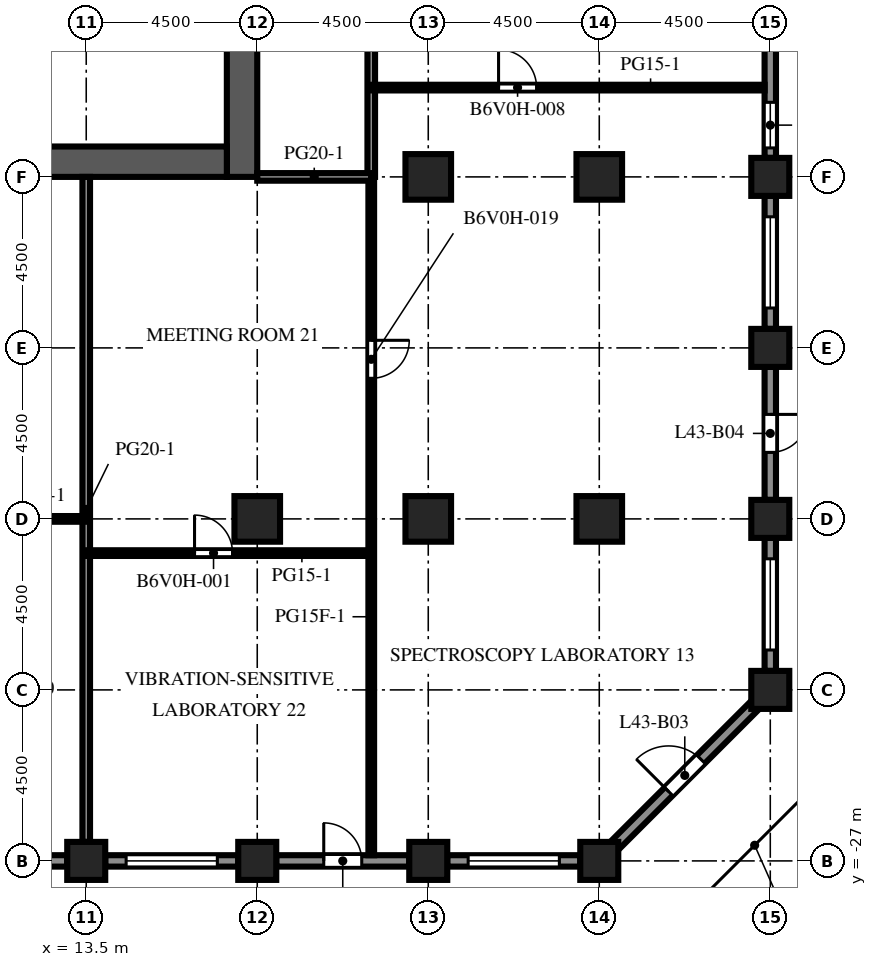
"""IFC4 building model, lengths in metres.
Left out: names, types, materials, properties, quantities, classifications, styles, units other than length and angle.
Written with IfcOpenShell. Run it as: python <this file> out.ifc"""

import sys

from ifc_helpers import new_model, si_unit, direction, frame, frame_2d, origin, origin_2d, place, context, subcontext, project, spatial, rectangle, extrude, element, fill, save


model = new_model("IFC4")
c1 = context("Model", 3, precision=1e-05, world=origin(), true_north=direction((0.0, 1.0)))
c2 = subcontext(c1, "Body", "Model", "MODEL_VIEW")
j1 = project(units=[si_unit("LENGTHUNIT", "METRE"), si_unit("PLANEANGLEUNIT", "RADIAN")], contexts=[c1])
p1 = place(None, origin())
s1 = spatial("IfcSite", under=j1, at=p1, CompositionType="ELEMENT")
p2 = place(p1, origin())
s2 = spatial("IfcBuilding", under=s1, at=p2, CompositionType="ELEMENT")
p3 = place(p2, frame((0.0, 0.0, 191.5)))
s3 = spatial("IfcBuildingStorey", under=s2, at=p3, CompositionType="ELEMENT", Elevation=191.5)
for number, where, z_axis, x_axis in (
    (1, (13.5, -27.0, 0.0), (0.0, 0.0, 1.0), (1.0, 0.0, 0.0)),
    (2, (18.0, -27.0, 0.0), (0.0, 0.0, 1.0), (1.0, 0.0, 0.0)),
    (3, (22.5, -27.0, 0.0), (0.0, 0.0, 1.0), (1.0, 0.0, 0.0)),
    (4, (27.0, -27.0, 0.0), (0.0, 0.0, 1.0), (1.0, 0.0, 0.0)),
):
    element("IfcColumn", number, at=place(p3, frame(where, z_axis=z_axis, x_axis=x_axis)), inside=s3, PredefinedType="COLUMN", context=c2, shape_type="SweptSolid", body=[
        extrude(rectangle(XDim=1.0, YDim=1.0, at=origin_2d()), origin(), (0.0, 0.0, 1.0), 4.1),
    ])
for number, where, z_axis, x_axis in (
    (5, (31.5, -22.5, -0.45), (0.0, 0.0, 1.0), (1.0, 0.0, 0.0)),
    (6, (31.5, -18.0, -0.45), (0.0, 0.0, 1.0), (1.0, 0.0, 0.0)),
    (7, (31.5, -13.5, -0.45), (0.0, 0.0, 1.0), (1.0, 0.0, 0.0)),
    (8, (31.5, -9.0, -0.45), (0.0, 0.0, 1.0), (1.0, 0.0, 0.0)),
):
    element("IfcColumn", number, at=place(p3, frame(where, z_axis=z_axis, x_axis=x_axis)), inside=s3, PredefinedType="COLUMN", context=c2, shape_type="SweptSolid", body=[
        extrude(rectangle(XDim=1.0, YDim=1.0, at=origin_2d()), origin(), (0.0, 0.0, 1.0), 4.55),
    ])
for number, where, z_axis, x_axis in (
    (9, (18.0, -18.0, -0.45), (0.0, 0.0, 1.0), (1.0, 0.0, 0.0)),
    (10, (22.5, -18.0, -0.45), (0.0, 0.0, 1.0), (1.0, 0.0, 0.0)),
    (11, (22.5, -9.0, -0.45), (0.0, 0.0, 1.0), (1.0, 0.0, 0.0)),
    (12, (27.0, -18.0, -0.45), (0.0, 0.0, 1.0), (1.0, 0.0, 0.0)),
    (13, (27.0, -9.0, -0.45), (0.0, 0.0, 1.0), (1.0, 0.0, 0.0)),
):
    element("IfcColumn", number, at=place(p3, frame(where, z_axis=z_axis, x_axis=x_axis)), inside=s3, PredefinedType="COLUMN", context=c2, shape_type="SweptSolid", body=[
        extrude(rectangle(XDim=1.2, YDim=1.2, at=origin_2d()), origin(), (0.0, 0.0, 1.0), 4.55),
    ])
p4 = place(p3, frame((17.6, -9.0, 0.0), z_axis=(0.0, 0.0, 1.0), x_axis=(0.0, 1.0, 0.0)))
e14 = element("IfcWall", 14, at=p4, inside=s3, PredefinedType="SHEAR", context=c2, shape_type="SweptSolid", body=[
    extrude(rectangle(XDim=27.5, YDim=0.8, at=frame_2d((13.75, 0.0))), origin(), (0.0, 0.0, 1.0), 4.1),
])
p5 = place(p4, frame((12.55, 0.0, 0.0)))
e15 = element("IfcOpeningElement", 15, at=p5, cuts=e14, PredefinedType="OPENING", context=c2, shape_type="SweptSolid", body=[
    extrude(rectangle(XDim=2.4, YDim=2.4, at=frame_2d((1.2, 1.2))), frame((0.0, 0.41, 0.0), z_axis=(0.0, -1.0, 0.0), x_axis=(1.0, 0.0, 0.0)), (0.0, 0.0, 1.0), 0.82),
])
p6 = place(p4, frame((6.825, 0.0, 0.0)))
e16 = element("IfcOpeningElement", 16, at=p6, cuts=e14, PredefinedType="OPENING", context=c2, shape_type="SweptSolid", body=[
    extrude(rectangle(XDim=1.2, YDim=2.1, at=frame_2d((0.6, 1.05))), frame((0.0, 0.41, 0.0), z_axis=(0.0, -1.0, 0.0), x_axis=(1.0, 0.0, 0.0)), (0.0, 0.0, 1.0), 0.82),
])
p7 = place(p4, frame((19.475, 0.0, 0.0)))
e17 = element("IfcOpeningElement", 17, at=p7, cuts=e14, PredefinedType="OPENING", context=c2, shape_type="SweptSolid", body=[
    extrude(rectangle(XDim=1.2, YDim=2.1, at=frame_2d((0.6, 1.05))), frame((0.0, 0.41, 0.0), z_axis=(0.0, -1.0, 0.0), x_axis=(1.0, 0.0, 0.0)), (0.0, 0.0, 1.0), 0.82),
])
p8 = place(p3, frame((6.8, -8.6, 0.0), z_axis=(0.0, 0.0, 1.0), x_axis=(1.0, 0.0, 0.0)))
e18 = element("IfcWall", 18, at=p8, inside=s3, PredefinedType="SHEAR", context=c2, shape_type="SweptSolid", body=[
    extrude(rectangle(XDim=10.4, YDim=0.8, at=frame_2d((5.2, 0.0))), origin(), (0.0, 0.0, 1.0), 4.1),
])
p9 = place(p3, frame((13.0, -27.0, 0.0), z_axis=(0.0, 0.0, 1.0), x_axis=(-1.0, 0.0, 0.0)))
e19 = element("IfcWall", 19, at=p9, inside=s3, PredefinedType="SOLIDWALL", context=c2, shape_type="SweptSolid", body=[
    extrude(rectangle(XDim=3.5, YDim=0.3, at=frame_2d((1.75, 0.0))), origin(), (0.0, 0.0, 1.0), 2.85),
])
p10 = place(p9, frame((0.55, 0.0, 0.8)))
e20 = element("IfcOpeningElement", 20, at=p10, cuts=e19, PredefinedType="OPENING", context=c2, shape_type="SweptSolid", body=[
    extrude(rectangle(XDim=2.4, YDim=1.7, at=frame_2d((1.2, 0.85))), frame((0.0, 0.16, 0.0), z_axis=(0.0, -1.0, 0.0), x_axis=(1.0, 0.0, 0.0)), (0.0, 0.0, 1.0), 0.32),
])
p11 = place(p3, frame((17.5, -27.0, 0.0), z_axis=(0.0, 0.0, 1.0), x_axis=(-1.0, 0.0, 0.0)))
e21 = element("IfcWall", 21, at=p11, inside=s3, PredefinedType="SOLIDWALL", context=c2, shape_type="SweptSolid", body=[
    extrude(rectangle(XDim=3.5, YDim=0.3, at=frame_2d((1.75, 0.0))), origin(), (0.0, 0.0, 1.0), 2.85),
])
p12 = place(p11, frame((0.55, 0.0, 0.8)))
e22 = element("IfcOpeningElement", 22, at=p12, cuts=e21, PredefinedType="OPENING", context=c2, shape_type="SweptSolid", body=[
    extrude(rectangle(XDim=2.4, YDim=1.7, at=frame_2d((1.2, 0.85))), frame((0.0, 0.16, 0.0), z_axis=(0.0, -1.0, 0.0), x_axis=(1.0, 0.0, 0.0)), (0.0, 0.0, 1.0), 0.32),
])
p13 = place(p3, frame((22.0, -27.0, 0.0), z_axis=(0.0, 0.0, 1.0), x_axis=(-1.0, 0.0, 0.0)))
e23 = element("IfcWall", 23, at=p13, inside=s3, PredefinedType="SOLIDWALL", context=c2, shape_type="SweptSolid", body=[
    extrude(rectangle(XDim=3.5, YDim=0.3, at=frame_2d((1.75, 0.0))), origin(), (0.0, 0.0, 1.0), 2.85),
])
p14 = place(p13, frame((1.25, 0.0, 0.0)))
e24 = element("IfcOpeningElement", 24, at=p14, cuts=e23, PredefinedType="OPENING", context=c2, shape_type="SweptSolid", body=[
    extrude(rectangle(XDim=1.0, YDim=2.2, at=frame_2d((0.5, 1.1))), frame((0.0, 0.16, 0.0), z_axis=(0.0, -1.0, 0.0), x_axis=(1.0, 0.0, 0.0)), (0.0, 0.0, 1.0), 0.32),
])
p15 = place(p3, frame((26.5, -27.0, 0.0), z_axis=(0.0, 0.0, 1.0), x_axis=(-1.0, 0.0, 0.0)))
e25 = element("IfcWall", 25, at=p15, inside=s3, PredefinedType="SOLIDWALL", context=c2, shape_type="SweptSolid", body=[
    extrude(rectangle(XDim=3.5, YDim=0.3, at=frame_2d((1.75, 0.0))), origin(), (0.0, 0.0, 1.0), 2.85),
])
p16 = place(p15, frame((0.55, 0.0, 0.8)))
e26 = element("IfcOpeningElement", 26, at=p16, cuts=e25, PredefinedType="OPENING", context=c2, shape_type="SweptSolid", body=[
    extrude(rectangle(XDim=2.4, YDim=1.7, at=frame_2d((1.2, 0.85))), frame((0.0, 0.16, 0.0), z_axis=(0.0, -1.0, 0.0), x_axis=(1.0, 0.0, 0.0)), (0.0, 0.0, 1.0), 0.32),
])
p17 = place(p3, frame((31.106, -22.894, 0.0), z_axis=(0.0, 0.0, 1.0), x_axis=(-0.707106781187, -0.707106781187, 0.0)))
e27 = element("IfcWall", 27, at=p17, inside=s3, PredefinedType="SOLIDWALL", context=c2, shape_type="SweptSolid", body=[
    extrude(rectangle(XDim=5.25, YDim=0.3, at=frame_2d((2.625, 0.0))), origin(), (0.0, 0.0, 1.0), 2.85),
])
p18 = place(p17, frame((2.025, 0.0, 0.0)))
e28 = element("IfcOpeningElement", 28, at=p18, cuts=e27, PredefinedType="OPENING", context=c2, shape_type="SweptSolid", body=[
    extrude(rectangle(XDim=1.2, YDim=2.2, at=frame_2d((0.6, 1.1))), frame((0.0, 0.16, 0.0), z_axis=(0.0, -1.0, 0.0), x_axis=(1.0, 0.0, 0.0)), (0.0, 0.0, 1.0), 0.32),
])
p19 = place(p3, frame((31.5, -18.5, 0.0), z_axis=(0.0, 0.0, 1.0), x_axis=(0.0, -1.0, 0.0)))
e29 = element("IfcWall", 29, at=p19, inside=s3, PredefinedType="SOLIDWALL", context=c2, shape_type="SweptSolid", body=[
    extrude(rectangle(XDim=3.5, YDim=0.3, at=frame_2d((1.75, 0.0))), origin(), (0.0, 0.0, 1.0), 2.85),
])
p20 = place(p19, frame((0.55, 0.0, 0.8)))
e30 = element("IfcOpeningElement", 30, at=p20, cuts=e29, PredefinedType="OPENING", context=c2, shape_type="SweptSolid", body=[
    extrude(rectangle(XDim=2.4, YDim=1.7, at=frame_2d((1.2, 0.85))), frame((0.0, 0.16, 0.0), z_axis=(0.0, -1.0, 0.0), x_axis=(1.0, 0.0, 0.0)), (0.0, 0.0, 1.0), 0.32),
])
p21 = place(p3, frame((31.5, -14.0, 0.0), z_axis=(0.0, 0.0, 1.0), x_axis=(0.0, -1.0, 0.0)))
e31 = element("IfcWall", 31, at=p21, inside=s3, PredefinedType="SOLIDWALL", context=c2, shape_type="SweptSolid", body=[
    extrude(rectangle(XDim=3.5, YDim=0.3, at=frame_2d((1.75, 0.0))), origin(), (0.0, 0.0, 1.0), 2.85),
])
p22 = place(p21, frame((1.25, 0.0, 0.0)))
e32 = element("IfcOpeningElement", 32, at=p22, cuts=e31, PredefinedType="OPENING", context=c2, shape_type="SweptSolid", body=[
    extrude(rectangle(XDim=1.0, YDim=2.2, at=frame_2d((0.5, 1.1))), frame((0.0, 0.16, 0.0), z_axis=(0.0, -1.0, 0.0), x_axis=(1.0, 0.0, 0.0)), (0.0, 0.0, 1.0), 0.32),
])
p23 = place(p3, frame((31.5, -9.5, 0.0), z_axis=(0.0, 0.0, 1.0), x_axis=(0.0, -1.0, 0.0)))
e33 = element("IfcWall", 33, at=p23, inside=s3, PredefinedType="SOLIDWALL", context=c2, shape_type="SweptSolid", body=[
    extrude(rectangle(XDim=3.5, YDim=0.3, at=frame_2d((1.75, 0.0))), origin(), (0.0, 0.0, 1.0), 2.85),
])
p24 = place(p23, frame((0.55, 0.0, 0.8)))
e34 = element("IfcOpeningElement", 34, at=p24, cuts=e33, PredefinedType="OPENING", context=c2, shape_type="SweptSolid", body=[
    extrude(rectangle(XDim=2.4, YDim=1.7, at=frame_2d((1.2, 0.85))), frame((0.0, 0.16, 0.0), z_axis=(0.0, -1.0, 0.0), x_axis=(1.0, 0.0, 0.0)), (0.0, 0.0, 1.0), 0.32),
])
p25 = place(p3, frame((31.5, -5.0, 0.0), z_axis=(0.0, 0.0, 1.0), x_axis=(0.0, -1.0, 0.0)))
e35 = element("IfcWall", 35, at=p25, inside=s3, PredefinedType="SOLIDWALL", context=c2, shape_type="SweptSolid", body=[
    extrude(rectangle(XDim=3.5, YDim=0.3, at=frame_2d((1.75, 0.0))), origin(), (0.0, 0.0, 1.0), 2.85),
])
p26 = place(p25, frame((2.038, 0.0, 0.8)))
e36 = element("IfcOpeningElement", 36, at=p26, cuts=e35, PredefinedType="OPENING", context=c2, shape_type="SweptSolid", body=[
    extrude(rectangle(XDim=1.2, YDim=1.7, at=frame_2d((0.6, 0.85))), frame((0.0, 0.16, 0.0), z_axis=(0.0, -1.0, 0.0), x_axis=(1.0, 0.0, 0.0)), (0.0, 0.0, 1.0), 0.32),
])
p27 = place(p3, frame((13.5, -26.5, 0.0), z_axis=(0.0, 0.0, 1.0), x_axis=(0.0, 1.0, 0.0)))
e37 = element("IfcWall", 37, at=p27, inside=s3, PredefinedType="PARTITIONING", context=c2, shape_type="SweptSolid", body=[
    extrude(rectangle(XDim=17.5, YDim=0.2, at=frame_2d((8.75, 0.0))), origin(), (0.0, 0.0, 1.0), 3.65),
])
p28 = place(p3, frame((21.0, -26.85, 0.0), z_axis=(0.0, 0.0, 1.0), x_axis=(0.0, 1.0, 0.0)))
e38 = element("IfcWall", 38, at=p28, inside=s3, PredefinedType="PARTITIONING", context=c2, shape_type="SweptSolid", body=[
    extrude(rectangle(XDim=17.85, YDim=0.15, at=frame_2d((8.925, 0.0))), origin(), (0.0, 0.0, 1.0), 3.65),
])
p29 = place(p28, frame((12.55, 0.0, 0.0)))
e39 = element("IfcOpeningElement", 39, at=p29, cuts=e38, PredefinedType="OPENING", context=c2, shape_type="SweptSolid", body=[
    extrude(rectangle(XDim=1.0, YDim=2.1, at=frame_2d((0.5, 1.05))), frame((0.0, 0.085, 0.0), z_axis=(0.0, -1.0, 0.0), x_axis=(1.0, 0.0, 0.0)), (0.0, 0.0, 1.0), 0.17),
])
p30 = place(p3, frame((21.0, -9.0, 0.0), z_axis=(0.0, 0.0, 1.0), x_axis=(0.0, 1.0, 0.0)))
e40 = element("IfcWall", 40, at=p30, inside=s3, PredefinedType="PARTITIONING", context=c2, shape_type="SweptSolid", body=[
    extrude(rectangle(XDim=12.25, YDim=0.2, at=frame_2d((6.125, 0.0))), origin(), (0.0, 0.0, 1.0), 3.65),
])
p31 = place(p3, frame((21.0, -18.9, 0.0), z_axis=(0.0, 0.0, 1.0), x_axis=(-1.0, 0.0, 0.0)))
e41 = element("IfcWall", 41, at=p31, inside=s3, PredefinedType="PARTITIONING", context=c2, shape_type="SweptSolid", body=[
    extrude(rectangle(XDim=7.5, YDim=0.15, at=frame_2d((3.75, 0.0))), origin(), (0.0, 0.0, 1.0), 3.65),
])
p32 = place(p31, frame((3.65, 0.0, 0.0)))
e42 = element("IfcOpeningElement", 42, at=p32, cuts=e41, PredefinedType="OPENING", context=c2, shape_type="SweptSolid", body=[
    extrude(rectangle(XDim=1.0, YDim=2.1, at=frame_2d((0.5, 1.05))), frame((0.0, 0.085, 0.0), z_axis=(0.0, -1.0, 0.0), x_axis=(1.0, 0.0, 0.0)), (0.0, 0.0, 1.0), 0.17),
])
p33 = place(p3, frame((13.5, -18.0, 0.0), z_axis=(0.0, 0.0, 1.0), x_axis=(-1.0, 0.0, 0.0)))
e43 = element("IfcWall", 43, at=p33, inside=s3, PredefinedType="PARTITIONING", context=c2, shape_type="SweptSolid", body=[
    extrude(rectangle(XDim=3.9, YDim=0.15, at=frame_2d((1.95, 0.0))), origin(), (0.0, 0.0, 1.0), 3.65),
])
p34 = place(p33, frame((2.65, 0.0, 0.0)))
e44 = element("IfcOpeningElement", 44, at=p34, cuts=e43, PredefinedType="OPENING", context=c2, shape_type="SweptSolid", body=[
    extrude(rectangle(XDim=1.0, YDim=2.1, at=frame_2d((0.5, 1.05))), frame((0.0, 0.085, 0.0), z_axis=(0.0, -1.0, 0.0), x_axis=(1.0, 0.0, 0.0)), (0.0, 0.0, 1.0), 0.17),
])
p35 = place(p3, frame((18.0, -9.0, 0.0), z_axis=(0.0, 0.0, 1.0), x_axis=(1.0, 0.0, 0.0)))
e45 = element("IfcWall", 45, at=p35, inside=s3, PredefinedType="PARTITIONING", context=c2, shape_type="SweptSolid", body=[
    extrude(rectangle(XDim=3.0, YDim=0.2, at=frame_2d((1.5, 0.0))), origin(), (0.0, 0.0, 1.0), 3.65),
])
p36 = place(p3, frame((31.35, -6.65, 0.0), z_axis=(0.0, 0.0, 1.0), x_axis=(-1.0, 0.0, 0.0)))
e46 = element("IfcWall", 46, at=p36, inside=s3, PredefinedType="PARTITIONING", context=c2, shape_type="SweptSolid", body=[
    extrude(rectangle(XDim=10.35, YDim=0.15, at=frame_2d((5.175, 0.0))), origin(), (0.0, 0.0, 1.0), 3.65),
])
p37 = place(p36, frame((6.0, 0.0, 0.0)))
e47 = element("IfcOpeningElement", 47, at=p37, cuts=e46, PredefinedType="OPENING", context=c2, shape_type="SweptSolid", body=[
    extrude(rectangle(XDim=1.0, YDim=2.1, at=frame_2d((0.5, 1.05))), frame((0.0, 0.085, 0.0), z_axis=(0.0, -1.0, 0.0), x_axis=(1.0, 0.0, 0.0)), (0.0, 0.0, 1.0), 0.17),
])
p38 = place(p12, origin())
e48 = element("IfcWindow", 48, at=p38, inside=s3, PartitioningType="SINGLE_PANEL", PredefinedType="WINDOW", context=c2, shape_type="SweptSolid", body=[
    extrude(rectangle(XDim=2.4, YDim=1.7, at=frame_2d((1.2, 0.85))), frame((0.0, 0.03, 0.0), z_axis=(0.0, -1.0, 0.0), x_axis=(1.0, 0.0, 0.0)), (0.0, 0.0, 1.0), 0.06),
])
fill(e22, e48)
p39 = place(p14, origin())
e49 = element("IfcDoor", 49, at=p39, inside=s3, OperationType="SINGLE_SWING_RIGHT", PredefinedType="DOOR", context=c2, shape_type="SweptSolid", body=[
    extrude(rectangle(XDim=1.0, YDim=2.2, at=frame_2d((0.5, 1.1))), frame((0.0, 0.025, 0.0), z_axis=(0.0, -1.0, 0.0), x_axis=(1.0, 0.0, 0.0)), (0.0, 0.0, 1.0), 0.05),
])
fill(e24, e49)
p40 = place(p16, origin())
e50 = element("IfcWindow", 50, at=p40, inside=s3, PartitioningType="SINGLE_PANEL", PredefinedType="WINDOW", context=c2, shape_type="SweptSolid", body=[
    extrude(rectangle(XDim=2.4, YDim=1.7, at=frame_2d((1.2, 0.85))), frame((0.0, 0.03, 0.0), z_axis=(0.0, -1.0, 0.0), x_axis=(1.0, 0.0, 0.0)), (0.0, 0.0, 1.0), 0.06),
])
fill(e26, e50)
p41 = place(p18, origin())
e51 = element("IfcDoor", 51, at=p41, inside=s3, OperationType="SINGLE_SWING_RIGHT", PredefinedType="DOOR", context=c2, shape_type="SweptSolid", body=[
    extrude(rectangle(XDim=1.2, YDim=2.2, at=frame_2d((0.6, 1.1))), frame((0.0, 0.025, 0.0), z_axis=(0.0, -1.0, 0.0), x_axis=(1.0, 0.0, 0.0)), (0.0, 0.0, 1.0), 0.05),
])
fill(e28, e51)
p42 = place(p20, origin())
e52 = element("IfcWindow", 52, at=p42, inside=s3, PartitioningType="SINGLE_PANEL", PredefinedType="WINDOW", context=c2, shape_type="SweptSolid", body=[
    extrude(rectangle(XDim=2.4, YDim=1.7, at=frame_2d((1.2, 0.85))), frame((0.0, 0.03, 0.0), z_axis=(0.0, -1.0, 0.0), x_axis=(1.0, 0.0, 0.0)), (0.0, 0.0, 1.0), 0.06),
])
fill(e30, e52)
p43 = place(p22, origin())
e53 = element("IfcDoor", 53, at=p43, inside=s3, OperationType="SINGLE_SWING_LEFT", PredefinedType="DOOR", context=c2, shape_type="SweptSolid", body=[
    extrude(rectangle(XDim=1.0, YDim=2.2, at=frame_2d((0.5, 1.1))), frame((0.0, 0.025, 0.0), z_axis=(0.0, -1.0, 0.0), x_axis=(1.0, 0.0, 0.0)), (0.0, 0.0, 1.0), 0.05),
])
fill(e32, e53)
p44 = place(p24, origin())
e54 = element("IfcWindow", 54, at=p44, inside=s3, PartitioningType="SINGLE_PANEL", PredefinedType="WINDOW", context=c2, shape_type="SweptSolid", body=[
    extrude(rectangle(XDim=2.4, YDim=1.7, at=frame_2d((1.2, 0.85))), frame((0.0, 0.03, 0.0), z_axis=(0.0, -1.0, 0.0), x_axis=(1.0, 0.0, 0.0)), (0.0, 0.0, 1.0), 0.06),
])
fill(e34, e54)
p45 = place(p26, origin())
e55 = element("IfcWindow", 55, at=p45, inside=s3, PartitioningType="SINGLE_PANEL", PredefinedType="WINDOW", context=c2, shape_type="SweptSolid", body=[
    extrude(rectangle(XDim=1.2, YDim=1.7, at=frame_2d((0.6, 0.85))), frame((0.0, 0.03, 0.0), z_axis=(0.0, -1.0, 0.0), x_axis=(1.0, 0.0, 0.0)), (0.0, 0.0, 1.0), 0.06),
])
fill(e36, e55)
p46 = place(p32, origin())
e56 = element("IfcDoor", 56, at=p46, inside=s3, OperationType="SINGLE_SWING_RIGHT", PredefinedType="DOOR", context=c2, shape_type="SweptSolid", body=[
    extrude(rectangle(XDim=1.0, YDim=2.1, at=frame_2d((0.5, 1.05))), frame((0.0, 0.025, 0.0), z_axis=(0.0, -1.0, 0.0), x_axis=(1.0, 0.0, 0.0)), (0.0, 0.0, 1.0), 0.05),
])
fill(e42, e56)
p47 = place(p37, origin())
e57 = element("IfcDoor", 57, at=p47, inside=s3, OperationType="SINGLE_SWING_RIGHT", PredefinedType="DOOR", context=c2, shape_type="SweptSolid", body=[
    extrude(rectangle(XDim=1.0, YDim=2.1, at=frame_2d((0.5, 1.05))), frame((0.0, 0.025, 0.0), z_axis=(0.0, -1.0, 0.0), x_axis=(1.0, 0.0, 0.0)), (0.0, 0.0, 1.0), 0.05),
])
fill(e47, e57)
p48 = place(p29, origin())
e58 = element("IfcDoor", 58, at=p48, inside=s3, OperationType="SINGLE_SWING_RIGHT", PredefinedType="DOOR", context=c2, shape_type="SweptSolid", body=[
    extrude(rectangle(XDim=1.0, YDim=2.1, at=frame_2d((0.5, 1.05))), frame((0.0, 0.025, 0.0), z_axis=(0.0, -1.0, 0.0), x_axis=(1.0, 0.0, 0.0)), (0.0, 0.0, 1.0), 0.05),
])
fill(e39, e58)
save(model, sys.argv[1])
